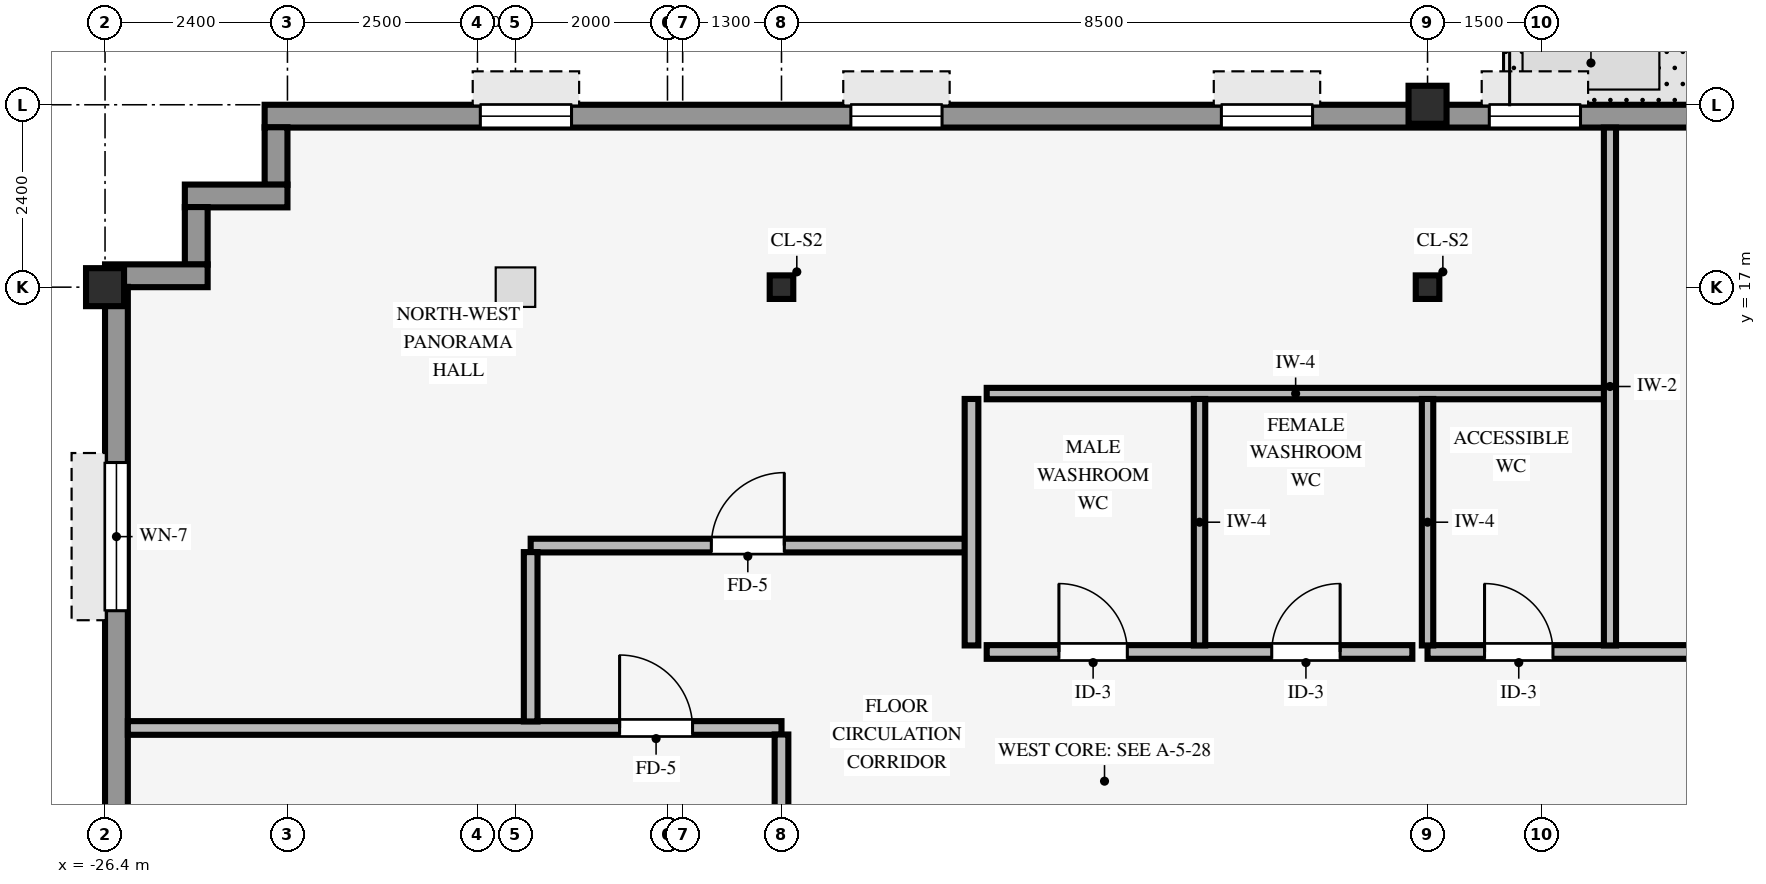
"""IFC4 building model, lengths in metres.
Left out: names, types, materials, properties, quantities, classifications, styles, units other than length and angle.
Written with IfcOpenShell. Run it as: python <this file> out.ifc"""

import sys

from ifc_helpers import new_model, si_unit, direction, frame, frame_2d, origin, origin_2d, place, context, subcontext, project, spatial, rectangle, hollow_rectangle, i_section, extrude, source, transform, mapped, element, fill, save


model = new_model("IFC4")
c1 = context("Model", 3, precision=1e-05, world=origin(), true_north=direction((0.0, 1.0)))
c2 = subcontext(c1, "Body", "Model", "MODEL_VIEW")
j1 = project(units=[si_unit("LENGTHUNIT", "METRE"), si_unit("PLANEANGLEUNIT", "RADIAN")], contexts=[c1])
p1 = place(None, origin())
s1 = spatial("IfcSite", under=j1, at=p1, CompositionType="ELEMENT")
p2 = place(p1, origin())
s2 = spatial("IfcBuilding", under=s1, at=p2, CompositionType="ELEMENT")
p3 = place(p2, frame((0.0, 0.0, 242.0)))
s3 = spatial("IfcBuildingStorey", under=s2, at=p3, CompositionType="ELEMENT", Elevation=242.0)
for number, where, z_axis, x_axis in (
    (1, (-26.4, 17.0, 0.0), (0.0, 0.0, 1.0), (1.0, 0.0, 0.0)),
    (2, (-9.0, 19.4, 0.0), (0.0, 0.0, 1.0), (1.0, 0.0, 0.0)),
):
    element("IfcColumn", number, at=place(p3, frame(where, z_axis=z_axis, x_axis=x_axis)), inside=s3, PredefinedType="COLUMN", context=c2, shape_type="SweptSolid", body=[
        extrude(hollow_rectangle(XDim=0.5, YDim=0.5, WallThickness=0.032, InnerFilletRadius=0.032, OuterFilletRadius=0.064, at=origin_2d()), origin(), (0.0, 0.0, 1.0), 3.25),
    ])
for number, where, z_axis, x_axis in (
    (3, (-17.5, 17.0, 0.0), (0.0, 0.0, 1.0), (1.0, 0.0, 0.0)),
    (4, (-9.0, 17.0, 0.0), (0.0, 0.0, 1.0), (1.0, 0.0, 0.0)),
):
    element("IfcColumn", number, at=place(p3, frame(where, z_axis=z_axis, x_axis=x_axis)), inside=s3, PredefinedType="COLUMN", context=c2, shape_type="SweptSolid", body=[
        extrude(i_section(OverallWidth=0.31, OverallDepth=0.31, WebThickness=0.015, FlangeThickness=0.015, FilletRadius=0.015, at=origin_2d()), origin(), (0.0, 0.0, 1.0), 3.25),
    ])
p4 = place(p3, frame((-24.3, 19.25, 0.0), z_axis=(0.0, 0.0, 1.0), x_axis=(1.0, 0.0, 0.0)))
e5 = element("IfcWall", 5, at=p4, inside=s3, PredefinedType="STANDARD", context=c2, shape_type="SweptSolid", body=[
    extrude(rectangle(XDim=41.0, YDim=0.3, at=frame_2d((20.5, 0.0))), origin(), (0.0, 0.0, 1.0), 2.585),
])
p5 = place(p4, frame((18.9, 0.0, 0.0)))
e6 = element("IfcOpeningElement", 6, at=p5, cuts=e5, PredefinedType="OPENING", context=c2, shape_type="SweptSolid", body=[
    extrude(rectangle(XDim=1.05, YDim=2.1, at=frame_2d((0.525, 1.05))), frame((0.0, 0.16, 0.0), z_axis=(0.0, -1.0, 0.0), x_axis=(1.0, 0.0, 0.0)), (0.0, 0.0, 1.0), 0.32),
])
p6 = place(p4, frame((2.837, 0.0, 0.8)))
e7 = element("IfcOpeningElement", 7, at=p6, cuts=e5, PredefinedType="OPENING", context=c2, shape_type="SweptSolid", body=[
    extrude(rectangle(XDim=1.2, YDim=1.48, at=frame_2d((0.6, 0.74))), frame((0.0, 0.16, 0.0), z_axis=(0.0, -1.0, 0.0), x_axis=(1.0, 0.0, 0.0)), (0.0, 0.0, 1.0), 0.32),
])
p7 = place(p4, frame((7.712, 0.0, 0.8)))
e8 = element("IfcOpeningElement", 8, at=p7, cuts=e5, PredefinedType="OPENING", context=c2, shape_type="SweptSolid", body=[
    extrude(rectangle(XDim=1.2, YDim=1.48, at=frame_2d((0.6, 0.74))), frame((0.0, 0.16, 0.0), z_axis=(0.0, -1.0, 0.0), x_axis=(1.0, 0.0, 0.0)), (0.0, 0.0, 1.0), 0.32),
])
p8 = place(p4, frame((12.587, 0.0, 0.8)))
e9 = element("IfcOpeningElement", 9, at=p8, cuts=e5, PredefinedType="OPENING", context=c2, shape_type="SweptSolid", body=[
    extrude(rectangle(XDim=1.2, YDim=1.48, at=frame_2d((0.6, 0.74))), frame((0.0, 0.16, 0.0), z_axis=(0.0, -1.0, 0.0), x_axis=(1.0, 0.0, 0.0)), (0.0, 0.0, 1.0), 0.32),
])
p9 = place(p4, frame((16.113, 0.0, 0.8)))
e10 = element("IfcOpeningElement", 10, at=p9, cuts=e5, PredefinedType="OPENING", context=c2, shape_type="SweptSolid", body=[
    extrude(rectangle(XDim=1.2, YDim=1.48, at=frame_2d((0.6, 0.74))), frame((0.0, 0.16, 0.0), z_axis=(0.0, -1.0, 0.0), x_axis=(1.0, 0.0, 0.0)), (0.0, 0.0, 1.0), 0.32),
])
p10 = place(p4, frame((21.887, 0.0, 0.8)))
e11 = element("IfcOpeningElement", 11, at=p10, cuts=e5, PredefinedType="OPENING", context=c2, shape_type="SweptSolid", body=[
    extrude(rectangle(XDim=1.2, YDim=1.48, at=frame_2d((0.6, 0.74))), frame((0.0, 0.16, 0.0), z_axis=(0.0, -1.0, 0.0), x_axis=(1.0, 0.0, 0.0)), (0.0, 0.0, 1.0), 0.32),
])
p11 = place(p4, frame((27.212, 0.0, 0.8)))
e12 = element("IfcOpeningElement", 12, at=p11, cuts=e5, PredefinedType="OPENING", context=c2, shape_type="SweptSolid", body=[
    extrude(rectangle(XDim=1.2, YDim=1.48, at=frame_2d((0.6, 0.74))), frame((0.0, 0.16, 0.0), z_axis=(0.0, -1.0, 0.0), x_axis=(1.0, 0.0, 0.0)), (0.0, 0.0, 1.0), 0.32),
])
p12 = place(p4, frame((31.188, 0.0, 0.8)))
e13 = element("IfcOpeningElement", 13, at=p12, cuts=e5, PredefinedType="OPENING", context=c2, shape_type="SweptSolid", body=[
    extrude(rectangle(XDim=1.2, YDim=1.48, at=frame_2d((0.6, 0.74))), frame((0.0, 0.16, 0.0), z_axis=(0.0, -1.0, 0.0), x_axis=(1.0, 0.0, 0.0)), (0.0, 0.0, 1.0), 0.32),
])
p13 = place(p4, frame((36.962, 0.0, 0.8)))
e14 = element("IfcOpeningElement", 14, at=p13, cuts=e5, PredefinedType="OPENING", context=c2, shape_type="SweptSolid", body=[
    extrude(rectangle(XDim=1.2, YDim=1.48, at=frame_2d((0.6, 0.74))), frame((0.0, 0.16, 0.0), z_axis=(0.0, -1.0, 0.0), x_axis=(1.0, 0.0, 0.0)), (0.0, 0.0, 1.0), 0.32),
])
p14 = place(p3, frame((-24.15, 18.346, 0.0), z_axis=(0.0, 0.0, 1.0), x_axis=(0.0, 1.0, 0.0)))
e15 = element("IfcWall", 15, at=p14, inside=s3, PredefinedType="STANDARD", context=c2, shape_type="SweptSolid", body=[
    extrude(rectangle(XDim=0.758, YDim=0.3, at=frame_2d((0.379, 0.0))), origin(), (0.0, 0.0, 1.0), 1.835),
])
p15 = place(p3, frame((-25.35, 18.2, 0.0), z_axis=(0.0, 0.0, 1.0), x_axis=(1.0, 0.0, 0.0)))
e16 = element("IfcWall", 16, at=p15, inside=s3, PredefinedType="STANDARD", context=c2, shape_type="SweptSolid", body=[
    extrude(rectangle(XDim=1.35, YDim=0.3, at=frame_2d((0.675, 0.0))), origin(), (0.0, 0.0, 1.0), 1.835),
])
p16 = place(p3, frame((-25.2, 17.296, 0.0), z_axis=(0.0, 0.0, 1.0), x_axis=(0.0, 1.0, 0.0)))
e17 = element("IfcWall", 17, at=p16, inside=s3, PredefinedType="STANDARD", context=c2, shape_type="SweptSolid", body=[
    extrude(rectangle(XDim=0.758, YDim=0.3, at=frame_2d((0.379, 0.0))), origin(), (0.0, 0.0, 1.0), 1.835),
])
p17 = place(p3, frame((-26.4, 17.15, 0.0), z_axis=(0.0, 0.0, 1.0), x_axis=(1.0, 0.0, 0.0)))
e18 = element("IfcWall", 18, at=p17, inside=s3, PredefinedType="STANDARD", context=c2, shape_type="SweptSolid", body=[
    extrude(rectangle(XDim=1.35, YDim=0.3, at=frame_2d((0.675, 0.0))), origin(), (0.0, 0.0, 1.0), 1.835),
])
p18 = place(p3, frame((-26.25, -17.004, 0.0), z_axis=(0.0, 0.0, 1.0), x_axis=(0.0, 1.0, 0.0)))
e19 = element("IfcWall", 19, at=p18, inside=s3, PredefinedType="STANDARD", context=c2, shape_type="SweptSolid", body=[
    extrude(rectangle(XDim=34.008, YDim=0.3, at=frame_2d((17.004, 0.0))), origin(), (0.0, 0.0, 1.0), 2.812),
])
p19 = place(p18, frame((2.311, 0.0, 0.8)))
e20 = element("IfcOpeningElement", 20, at=p19, cuts=e19, PredefinedType="OPENING", context=c2, shape_type="SweptSolid", body=[
    extrude(rectangle(XDim=1.95, YDim=1.48, at=frame_2d((0.975, 0.74))), frame((0.0, 0.16, 0.0), z_axis=(0.0, -1.0, 0.0), x_axis=(1.0, 0.0, 0.0)), (0.0, 0.0, 1.0), 0.32),
])
p20 = place(p18, frame((8.234, 0.0, 0.8)))
e21 = element("IfcOpeningElement", 21, at=p20, cuts=e19, PredefinedType="OPENING", context=c2, shape_type="SweptSolid", body=[
    extrude(rectangle(XDim=1.95, YDim=1.48, at=frame_2d((0.975, 0.74))), frame((0.0, 0.16, 0.0), z_axis=(0.0, -1.0, 0.0), x_axis=(1.0, 0.0, 0.0)), (0.0, 0.0, 1.0), 0.32),
])
p21 = place(p18, frame((11.456, 0.0, 0.8)))
e22 = element("IfcOpeningElement", 22, at=p21, cuts=e19, PredefinedType="OPENING", context=c2, shape_type="SweptSolid", body=[
    extrude(rectangle(XDim=1.95, YDim=1.48, at=frame_2d((0.975, 0.74))), frame((0.0, 0.16, 0.0), z_axis=(0.0, -1.0, 0.0), x_axis=(1.0, 0.0, 0.0)), (0.0, 0.0, 1.0), 0.32),
])
p22 = place(p18, frame((20.602, 0.0, 0.8)))
e23 = element("IfcOpeningElement", 23, at=p22, cuts=e19, PredefinedType="OPENING", context=c2, shape_type="SweptSolid", body=[
    extrude(rectangle(XDim=1.95, YDim=1.48, at=frame_2d((0.975, 0.74))), frame((0.0, 0.16, 0.0), z_axis=(0.0, -1.0, 0.0), x_axis=(1.0, 0.0, 0.0)), (0.0, 0.0, 1.0), 0.32),
])
p23 = place(p18, frame((23.824, 0.0, 0.8)))
e24 = element("IfcOpeningElement", 24, at=p23, cuts=e19, PredefinedType="OPENING", context=c2, shape_type="SweptSolid", body=[
    extrude(rectangle(XDim=1.95, YDim=1.48, at=frame_2d((0.975, 0.74))), frame((0.0, 0.16, 0.0), z_axis=(0.0, -1.0, 0.0), x_axis=(1.0, 0.0, 0.0)), (0.0, 0.0, 1.0), 0.32),
])
p24 = place(p18, frame((29.747, 0.0, 0.8)))
e25 = element("IfcOpeningElement", 25, at=p24, cuts=e19, PredefinedType="OPENING", context=c2, shape_type="SweptSolid", body=[
    extrude(rectangle(XDim=1.95, YDim=1.48, at=frame_2d((0.975, 0.74))), frame((0.0, 0.16, 0.0), z_axis=(0.0, -1.0, 0.0), x_axis=(1.0, 0.0, 0.0)), (0.0, 0.0, 1.0), 0.32),
])
p25 = place(p3, frame((-26.1, 11.2, 0.0), z_axis=(0.0, 0.0, 1.0), x_axis=(1.0, 0.0, 0.0)))
e26 = element("IfcWall", 26, at=p25, inside=s3, PredefinedType="PARTITIONING", context=c2, shape_type="SweptSolid", body=[
    extrude(rectangle(XDim=8.6, YDim=0.18, at=frame_2d((4.3, 0.0))), origin(), (0.0, 0.0, 1.0), 3.24),
])
p26 = place(p25, frame((6.47, 0.0, 0.0)))
e27 = element("IfcOpeningElement", 27, at=p26, cuts=e26, PredefinedType="OPENING", context=c2, shape_type="SweptSolid", body=[
    extrude(rectangle(XDim=0.96, YDim=2.1, at=frame_2d((0.48, 1.05))), frame((0.0, 0.1, 0.0), z_axis=(0.0, -1.0, 0.0), x_axis=(1.0, 0.0, 0.0)), (0.0, 0.0, 1.0), 0.2),
])
p27 = place(p3, frame((-14.8, 12.2, 0.0), z_axis=(0.0, 0.0, 1.0), x_axis=(1.0, 0.0, 0.0)))
e28 = element("IfcWall", 28, at=p27, inside=s3, PredefinedType="PARTITIONING", context=c2, shape_type="SweptSolid", body=[
    extrude(rectangle(XDim=5.6, YDim=0.18, at=frame_2d((2.8, 0.0))), origin(), (0.0, 0.0, 1.0), 3.24),
])
p28 = place(p27, frame((0.95, 0.0, 0.0)))
e29 = element("IfcOpeningElement", 29, at=p28, cuts=e28, PredefinedType="OPENING", context=c2, shape_type="SweptSolid", body=[
    extrude(rectangle(XDim=0.9, YDim=2.1, at=frame_2d((0.45, 1.05))), frame((0.0, 0.1, 0.0), z_axis=(0.0, -1.0, 0.0), x_axis=(1.0, 0.0, 0.0)), (0.0, 0.0, 1.0), 0.2),
])
p29 = place(p27, frame((3.75, 0.0, 0.0)))
e30 = element("IfcOpeningElement", 30, at=p29, cuts=e28, PredefinedType="OPENING", context=c2, shape_type="SweptSolid", body=[
    extrude(rectangle(XDim=0.9, YDim=2.1, at=frame_2d((0.45, 1.05))), frame((0.0, 0.1, 0.0), z_axis=(0.0, -1.0, 0.0), x_axis=(1.0, 0.0, 0.0)), (0.0, 0.0, 1.0), 0.2),
])
p30 = place(p3, frame((-9.0, 12.2, 0.0), z_axis=(0.0, 0.0, 1.0), x_axis=(1.0, 0.0, 0.0)))
e31 = element("IfcWall", 31, at=p30, inside=s3, PredefinedType="PARTITIONING", context=c2, shape_type="SweptSolid", body=[
    extrude(rectangle(XDim=24.8, YDim=0.18, at=frame_2d((12.4, 0.0))), origin(), (0.0, 0.0, 1.0), 3.24),
])
p31 = place(p30, frame((11.42, 0.0, 0.0)))
e32 = element("IfcOpeningElement", 32, at=p31, cuts=e31, PredefinedType="OPENING", context=c2, shape_type="SweptSolid", body=[
    extrude(rectangle(XDim=0.96, YDim=2.1, at=frame_2d((0.48, 1.05))), frame((0.0, 0.1, 0.0), z_axis=(0.0, -1.0, 0.0), x_axis=(1.0, 0.0, 0.0)), (0.0, 0.0, 1.0), 0.2),
])
p32 = place(p30, frame((20.92, 0.0, 0.0)))
e33 = element("IfcOpeningElement", 33, at=p32, cuts=e31, PredefinedType="OPENING", context=c2, shape_type="SweptSolid", body=[
    extrude(rectangle(XDim=0.96, YDim=2.1, at=frame_2d((0.48, 1.05))), frame((0.0, 0.1, 0.0), z_axis=(0.0, -1.0, 0.0), x_axis=(1.0, 0.0, 0.0)), (0.0, 0.0, 1.0), 0.2),
])
p33 = place(p30, frame((4.82, 0.0, 0.0)))
e34 = element("IfcOpeningElement", 34, at=p33, cuts=e31, PredefinedType="OPENING", context=c2, shape_type="SweptSolid", body=[
    extrude(rectangle(XDim=0.96, YDim=2.1, at=frame_2d((0.48, 1.05))), frame((0.0, 0.1, 0.0), z_axis=(0.0, -1.0, 0.0), x_axis=(1.0, 0.0, 0.0)), (0.0, 0.0, 1.0), 0.2),
])
p34 = place(p30, frame((0.75, 0.0, 0.0)))
e35 = element("IfcOpeningElement", 35, at=p34, cuts=e31, PredefinedType="OPENING", context=c2, shape_type="SweptSolid", body=[
    extrude(rectangle(XDim=0.9, YDim=2.1, at=frame_2d((0.45, 1.05))), frame((0.0, 0.1, 0.0), z_axis=(0.0, -1.0, 0.0), x_axis=(1.0, 0.0, 0.0)), (0.0, 0.0, 1.0), 0.2),
])
p35 = place(p3, frame((-20.8, 13.6, 0.0), z_axis=(0.0, 0.0, 1.0), x_axis=(1.0, 0.0, 0.0)))
e36 = element("IfcWall", 36, at=p35, inside=s3, PredefinedType="PARTITIONING", context=c2, shape_type="SweptSolid", body=[
    extrude(rectangle(XDim=5.714, YDim=0.18, at=frame_2d((2.857, 0.0))), origin(), (0.0, 0.0, 1.0), 2.929),
])
p36 = place(p35, frame((2.377, 0.0, 0.0)))
e37 = element("IfcOpeningElement", 37, at=p36, cuts=e36, PredefinedType="OPENING", context=c2, shape_type="SweptSolid", body=[
    extrude(rectangle(XDim=0.96, YDim=2.1, at=frame_2d((0.48, 1.05))), frame((0.0, 0.1, 0.0), z_axis=(0.0, -1.0, 0.0), x_axis=(1.0, 0.0, 0.0)), (0.0, 0.0, 1.0), 0.2),
])
p37 = place(p3, frame((-14.8, 15.6, 0.0), z_axis=(0.0, 0.0, 1.0), x_axis=(1.0, 0.0, 0.0)))
e38 = element("IfcWall", 38, at=p37, inside=s3, PredefinedType="PARTITIONING", context=c2, shape_type="SweptSolid", body=[
    extrude(rectangle(XDim=8.129, YDim=0.15, at=frame_2d((4.064, 0.0))), origin(), (0.0, 0.0, 1.0), 3.24),
])
p38 = place(p3, frame((-20.8, 11.286, 0.0), z_axis=(0.0, 0.0, 1.0), x_axis=(0.0, 1.0, 0.0)))
e39 = element("IfcWall", 39, at=p38, inside=s3, PredefinedType="PARTITIONING", context=c2, shape_type="SweptSolid", body=[
    extrude(rectangle(XDim=2.228, YDim=0.18, at=frame_2d((1.114, 0.0))), origin(), (0.0, 0.0, 1.0), 2.585),
])
p39 = place(p3, frame((-17.5, 9.996, 0.0), z_axis=(0.0, 0.0, 1.0), x_axis=(0.0, 1.0, 0.0)))
e40 = element("IfcWall", 40, at=p39, inside=s3, PredefinedType="PARTITIONING", context=c2, shape_type="SweptSolid", body=[
    extrude(rectangle(XDim=1.118, YDim=0.18, at=frame_2d((0.559, 0.0))), origin(), (0.0, 0.0, 1.0), 2.772),
])
p40 = place(p3, frame((-15.0, 12.286, 0.0), z_axis=(0.0, 0.0, 1.0), x_axis=(0.0, 1.0, 0.0)))
e41 = element("IfcWall", 41, at=p40, inside=s3, PredefinedType="PARTITIONING", context=c2, shape_type="SweptSolid", body=[
    extrude(rectangle(XDim=3.243, YDim=0.18, at=frame_2d((1.622, 0.0))), origin(), (0.0, 0.0, 1.0), 3.24),
])
p41 = place(p3, frame((-12.0, 12.286, 0.0), z_axis=(0.0, 0.0, 1.0), x_axis=(0.0, 1.0, 0.0)))
e42 = element("IfcWall", 42, at=p41, inside=s3, PredefinedType="PARTITIONING", context=c2, shape_type="SweptSolid", body=[
    extrude(rectangle(XDim=3.243, YDim=0.15, at=frame_2d((1.622, 0.0))), origin(), (0.0, 0.0, 1.0), 3.24),
])
p42 = place(p3, frame((-9.0, 12.286, 0.0), z_axis=(0.0, 0.0, 1.0), x_axis=(0.0, 1.0, 0.0)))
e43 = element("IfcWall", 43, at=p42, inside=s3, PredefinedType="PARTITIONING", context=c2, shape_type="SweptSolid", body=[
    extrude(rectangle(XDim=3.243, YDim=0.15, at=frame_2d((1.622, 0.0))), origin(), (0.0, 0.0, 1.0), 2.772),
])
p43 = place(p3, frame((-6.6, 12.286, 0.0), z_axis=(0.0, 0.0, 1.0), x_axis=(0.0, 1.0, 0.0)))
e44 = element("IfcWall", 44, at=p43, inside=s3, PredefinedType="PARTITIONING", context=c2, shape_type="SweptSolid", body=[
    extrude(rectangle(XDim=6.814, YDim=0.16, at=frame_2d((3.407, 0.0))), origin(), (0.0, 0.0, 1.0), 3.24),
])
m1 = source(origin(), c2, "Body", "SweptSolid", [
    extrude(rectangle(XDim=1.2, YDim=1.48, at=frame_2d((0.6, 0.74))), frame((0.0, 0.03, 0.0), z_axis=(0.0, -1.0, 0.0), x_axis=(1.0, 0.0, 0.0)), (0.0, 0.0, 1.0), 0.06),
])
p44 = place(p6, origin())
e45 = element("IfcWindow", 45, at=p44, inside=s3, PartitioningType="SINGLE_PANEL", PredefinedType="WINDOW", context=c2, shape_type="MappedRepresentation", body=[
    mapped(m1, transform((0.0, 0.0, 0.0), scale=1.0)),
])
fill(e7, e45)
p45 = place(p7, origin())
e46 = element("IfcWindow", 46, at=p45, inside=s3, PartitioningType="SINGLE_PANEL", PredefinedType="WINDOW", context=c2, shape_type="MappedRepresentation", body=[
    mapped(m1, transform((0.0, 0.0, 0.0), scale=1.0)),
])
fill(e8, e46)
p46 = place(p8, origin())
e47 = element("IfcWindow", 47, at=p46, inside=s3, PartitioningType="SINGLE_PANEL", PredefinedType="WINDOW", context=c2, shape_type="MappedRepresentation", body=[
    mapped(m1, transform((0.0, 0.0, 0.0), scale=1.0)),
])
fill(e9, e47)
p47 = place(p9, origin())
e48 = element("IfcWindow", 48, at=p47, inside=s3, PartitioningType="SINGLE_PANEL", PredefinedType="WINDOW", context=c2, shape_type="MappedRepresentation", body=[
    mapped(m1, transform((0.0, 0.0, 0.0), scale=1.0)),
])
fill(e10, e48)
m2 = source(origin(), c2, "Body", "SweptSolid", [
    extrude(rectangle(XDim=1.95, YDim=1.48, at=frame_2d((0.975, 0.74))), frame((0.0, 0.03, 0.0), z_axis=(0.0, -1.0, 0.0), x_axis=(1.0, 0.0, 0.0)), (0.0, 0.0, 1.0), 0.06),
])
p48 = place(p24, origin())
e49 = element("IfcWindow", 49, at=p48, inside=s3, PartitioningType="SINGLE_PANEL", PredefinedType="WINDOW", context=c2, shape_type="MappedRepresentation", body=[
    mapped(m2, transform((0.0, 0.0, 0.0), scale=1.0)),
])
fill(e25, e49)
m3 = source(origin(), c2, "Body", "SweptSolid", [
    extrude(rectangle(XDim=0.96, YDim=2.1, at=frame_2d((0.48, 1.05))), frame((0.0, 0.025, 0.0), z_axis=(0.0, -1.0, 0.0), x_axis=(1.0, 0.0, 0.0)), (0.0, 0.0, 1.0), 0.05),
])
p49 = place(p36, origin())
e50 = element("IfcDoor", 50, at=p49, inside=s3, OperationType="SINGLE_SWING_RIGHT", PredefinedType="DOOR", context=c2, shape_type="MappedRepresentation", body=[
    mapped(m3, transform((0.0, 0.0, 0.0), scale=1.0)),
])
fill(e37, e50)
p50 = place(p26, origin())
e51 = element("IfcDoor", 51, at=p50, inside=s3, OperationType="SINGLE_SWING_LEFT", PredefinedType="DOOR", context=c2, shape_type="MappedRepresentation", body=[
    mapped(m3, transform((0.0, 0.0, 0.0), scale=1.0)),
])
fill(e27, e51)
m4 = source(origin(), c2, "Body", "SweptSolid", [
    extrude(rectangle(XDim=0.9, YDim=2.1, at=frame_2d((0.45, 1.05))), frame((0.0, 0.025, 0.0), z_axis=(0.0, -1.0, 0.0), x_axis=(1.0, 0.0, 0.0)), (0.0, 0.0, 1.0), 0.05),
])
p51 = place(p28, origin())
e52 = element("IfcDoor", 52, at=p51, inside=s3, OperationType="SINGLE_SWING_LEFT", PredefinedType="DOOR", context=c2, shape_type="MappedRepresentation", body=[
    mapped(m4, transform((0.0, 0.0, 0.0), scale=1.0)),
])
fill(e29, e52)
p52 = place(p29, origin())
e53 = element("IfcDoor", 53, at=p52, inside=s3, OperationType="SINGLE_SWING_RIGHT", PredefinedType="DOOR", context=c2, shape_type="MappedRepresentation", body=[
    mapped(m4, transform((0.0, 0.0, 0.0), scale=1.0)),
])
fill(e30, e53)
p53 = place(p34, origin())
e54 = element("IfcDoor", 54, at=p53, inside=s3, OperationType="SINGLE_SWING_LEFT", PredefinedType="DOOR", context=c2, shape_type="MappedRepresentation", body=[
    mapped(m4, transform((0.0, 0.0, 0.0), scale=1.0)),
])
fill(e35, e54)
save(model, sys.argv[1])
